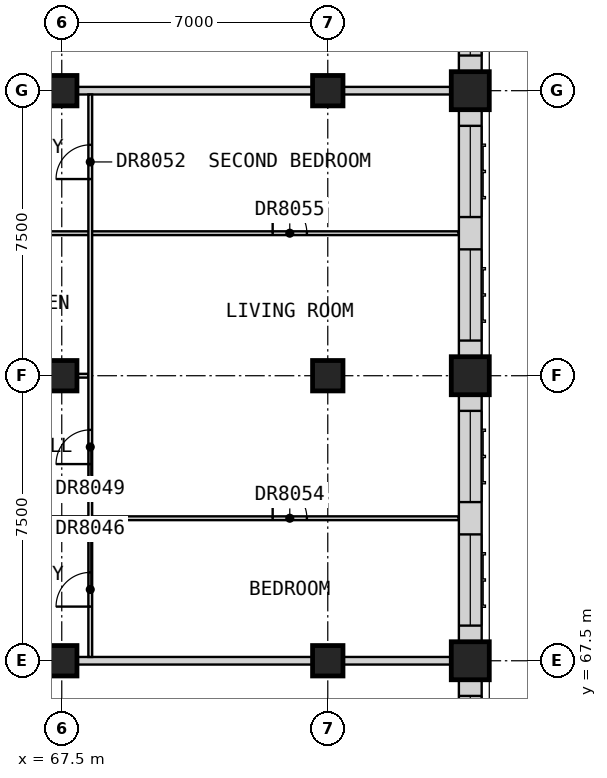
"""IFC4 building model, lengths in metres.
Left out: names, types, materials, properties, quantities, classifications, styles, units other than length and angle.
Written with IfcOpenShell. Run it as: python <this file> out.ifc"""

import sys

from ifc_helpers import new_model, si_unit, direction, frame, frame_2d, origin, origin_2d, place, context, subcontext, project, spatial, rectangle, extrude, element, fill, save


model = new_model("IFC4")
c1 = context("Model", 3, precision=1e-05, world=origin(), true_north=direction((0.0, 1.0)))
c2 = subcontext(c1, "Body", "Model", "MODEL_VIEW")
j1 = project(units=[si_unit("LENGTHUNIT", "METRE"), si_unit("PLANEANGLEUNIT", "RADIAN")], contexts=[c1])
p1 = place(None, origin())
s1 = spatial("IfcSite", under=j1, at=p1, CompositionType="ELEMENT")
p2 = place(p1, origin())
s2 = spatial("IfcBuilding", under=s1, at=p2, CompositionType="ELEMENT")
p3 = place(p2, frame((0.0, 0.0, 233.7)))
s3 = spatial("IfcBuildingStorey", under=s2, at=p3, CompositionType="ELEMENT", Elevation=233.7)
for number, where, z_axis, x_axis in (
    (1, (78.25, 67.5, 0.0), (0.0, 0.0, 1.0), (1.0, 0.0, 0.0)),
    (2, (78.25, 75.0, 0.0), (0.0, 0.0, 1.0), (1.0, 0.0, 0.0)),
    (3, (78.25, 82.5, 0.0), (0.0, 0.0, 1.0), (1.0, 0.0, 0.0)),
):
    element("IfcColumn", number, at=place(p3, frame(where, z_axis=z_axis, x_axis=x_axis)), inside=s3, PredefinedType="COLUMN", context=c2, shape_type="SweptSolid", body=[
        extrude(rectangle(XDim=1.0, YDim=1.0, at=origin_2d()), origin(), (0.0, 0.0, 1.0), 3.5),
    ])
for number, where, z_axis, x_axis in (
    (4, (67.5, 67.5, 0.0), (0.0, 0.0, 1.0), (1.0, 0.0, 0.0)),
    (5, (67.5, 75.0, 0.0), (0.0, 0.0, 1.0), (1.0, 0.0, 0.0)),
    (6, (67.5, 82.5, 0.0), (0.0, 0.0, 1.0), (1.0, 0.0, 0.0)),
    (7, (74.5, 67.5, 0.0), (0.0, 0.0, 1.0), (1.0, 0.0, 0.0)),
    (8, (74.5, 75.0, 0.0), (0.0, 0.0, 1.0), (1.0, 0.0, 0.0)),
    (9, (74.5, 82.5, 0.0), (0.0, 0.0, 1.0), (1.0, 0.0, 0.0)),
):
    element("IfcColumn", number, at=place(p3, frame(where, z_axis=z_axis, x_axis=x_axis)), inside=s3, PredefinedType="COLUMN", context=c2, shape_type="SweptSolid", body=[
        extrude(rectangle(XDim=0.8, YDim=0.8, at=origin_2d()), origin(), (0.0, 0.0, 1.0), 3.5),
    ])
p4 = place(p3, frame((78.25, 60.5, 0.0), z_axis=(0.0, 0.0, 1.0), x_axis=(0.0, 1.0, 0.0)))
e10 = element("IfcWall", 10, at=p4, inside=s3, PredefinedType="SOLIDWALL", context=c2, shape_type="SweptSolid", body=[
    extrude(rectangle(XDim=6.5, YDim=0.6, at=frame_2d((3.25, 0.0))), origin(), (0.0, 0.0, 1.0), 2.75),
])
p5 = place(p4, frame((0.425, 0.0, 0.8)))
e11 = element("IfcOpeningElement", 11, at=p5, cuts=e10, PredefinedType="OPENING", context=c2, shape_type="SweptSolid", body=[
    extrude(rectangle(XDim=2.4, YDim=1.8, at=frame_2d((1.2, 0.9))), frame((0.0, 0.31, 0.0), z_axis=(0.0, -1.0, 0.0), x_axis=(1.0, 0.0, 0.0)), (0.0, 0.0, 1.0), 0.62),
])
p6 = place(p4, frame((3.675, 0.0, 0.8)))
e12 = element("IfcOpeningElement", 12, at=p6, cuts=e10, PredefinedType="OPENING", context=c2, shape_type="SweptSolid", body=[
    extrude(rectangle(XDim=2.4, YDim=1.8, at=frame_2d((1.2, 0.9))), frame((0.0, 0.31, 0.0), z_axis=(0.0, -1.0, 0.0), x_axis=(1.0, 0.0, 0.0)), (0.0, 0.0, 1.0), 0.62),
])
p7 = place(p3, frame((78.25, 68.0, 0.0), z_axis=(0.0, 0.0, 1.0), x_axis=(0.0, 1.0, 0.0)))
e13 = element("IfcWall", 13, at=p7, inside=s3, PredefinedType="SOLIDWALL", context=c2, shape_type="SweptSolid", body=[
    extrude(rectangle(XDim=6.5, YDim=0.6, at=frame_2d((3.25, 0.0))), origin(), (0.0, 0.0, 1.0), 2.75),
])
p8 = place(p7, frame((0.425, 0.0, 0.8)))
e14 = element("IfcOpeningElement", 14, at=p8, cuts=e13, PredefinedType="OPENING", context=c2, shape_type="SweptSolid", body=[
    extrude(rectangle(XDim=2.4, YDim=1.8, at=frame_2d((1.2, 0.9))), frame((0.0, 0.31, 0.0), z_axis=(0.0, -1.0, 0.0), x_axis=(1.0, 0.0, 0.0)), (0.0, 0.0, 1.0), 0.62),
])
p9 = place(p7, frame((3.675, 0.0, 0.8)))
e15 = element("IfcOpeningElement", 15, at=p9, cuts=e13, PredefinedType="OPENING", context=c2, shape_type="SweptSolid", body=[
    extrude(rectangle(XDim=2.4, YDim=1.8, at=frame_2d((1.2, 0.9))), frame((0.0, 0.31, 0.0), z_axis=(0.0, -1.0, 0.0), x_axis=(1.0, 0.0, 0.0)), (0.0, 0.0, 1.0), 0.62),
])
p10 = place(p3, frame((78.25, 75.5, 0.0), z_axis=(0.0, 0.0, 1.0), x_axis=(0.0, 1.0, 0.0)))
e16 = element("IfcWall", 16, at=p10, inside=s3, PredefinedType="SOLIDWALL", context=c2, shape_type="SweptSolid", body=[
    extrude(rectangle(XDim=6.5, YDim=0.6, at=frame_2d((3.25, 0.0))), origin(), (0.0, 0.0, 1.0), 2.75),
])
p11 = place(p10, frame((0.425, 0.0, 0.8)))
e17 = element("IfcOpeningElement", 17, at=p11, cuts=e16, PredefinedType="OPENING", context=c2, shape_type="SweptSolid", body=[
    extrude(rectangle(XDim=2.4, YDim=1.8, at=frame_2d((1.2, 0.9))), frame((0.0, 0.31, 0.0), z_axis=(0.0, -1.0, 0.0), x_axis=(1.0, 0.0, 0.0)), (0.0, 0.0, 1.0), 0.62),
])
p12 = place(p10, frame((3.675, 0.0, 0.8)))
e18 = element("IfcOpeningElement", 18, at=p12, cuts=e16, PredefinedType="OPENING", context=c2, shape_type="SweptSolid", body=[
    extrude(rectangle(XDim=2.4, YDim=1.8, at=frame_2d((1.2, 0.9))), frame((0.0, 0.31, 0.0), z_axis=(0.0, -1.0, 0.0), x_axis=(1.0, 0.0, 0.0)), (0.0, 0.0, 1.0), 0.62),
])
p13 = place(p3, frame((78.25, 83.0, 0.0), z_axis=(0.0, 0.0, 1.0), x_axis=(0.0, 1.0, 0.0)))
e19 = element("IfcWall", 19, at=p13, inside=s3, PredefinedType="SOLIDWALL", context=c2, shape_type="SweptSolid", body=[
    extrude(rectangle(XDim=6.5, YDim=0.6, at=frame_2d((3.25, 0.0))), origin(), (0.0, 0.0, 1.0), 2.75),
])
p14 = place(p13, frame((0.425, 0.0, 0.8)))
e20 = element("IfcOpeningElement", 20, at=p14, cuts=e19, PredefinedType="OPENING", context=c2, shape_type="SweptSolid", body=[
    extrude(rectangle(XDim=2.4, YDim=1.8, at=frame_2d((1.2, 0.9))), frame((0.0, 0.31, 0.0), z_axis=(0.0, -1.0, 0.0), x_axis=(1.0, 0.0, 0.0)), (0.0, 0.0, 1.0), 0.62),
])
p15 = place(p13, frame((3.675, 0.0, 0.8)))
e21 = element("IfcOpeningElement", 21, at=p15, cuts=e19, PredefinedType="OPENING", context=c2, shape_type="SweptSolid", body=[
    extrude(rectangle(XDim=2.4, YDim=1.8, at=frame_2d((1.2, 0.9))), frame((0.0, 0.31, 0.0), z_axis=(0.0, -1.0, 0.0), x_axis=(1.0, 0.0, 0.0)), (0.0, 0.0, 1.0), 0.62),
])
for number, where, z_axis, x_axis in (
    (22, (61.875, 67.5, 0.0), (0.0, 0.0, 1.0), (1.0, 0.0, 0.0)),
    (23, (61.875, 82.5, 0.0), (0.0, 0.0, 1.0), (1.0, 0.0, 0.0)),
):
    element("IfcWall", number, at=place(p3, frame(where, z_axis=z_axis, x_axis=x_axis)), inside=s3, PredefinedType="PARTITIONING", context=c2, shape_type="SweptSolid", body=[
        extrude(rectangle(XDim=16.875, YDim=0.2, at=frame_2d((8.438, 0.0))), origin(), (0.0, 0.0, 1.0), 3.25),
    ])
p16 = place(p3, frame((65.087, 71.25, 0.0), z_axis=(0.0, 0.0, 1.0), x_axis=(1.0, 0.0, 0.0)))
e24 = element("IfcWall", 24, at=p16, inside=s3, PredefinedType="PARTITIONING", context=c2, shape_type="SweptSolid", body=[
    extrude(rectangle(XDim=12.853, YDim=0.1, at=frame_2d((6.426, 0.0))), origin(), (0.0, 0.0, 1.0), 3.25),
])
p17 = place(p16, frame((7.962, 0.0, 0.0)))
e25 = element("IfcOpeningElement", 25, at=p17, cuts=e24, PredefinedType="OPENING", context=c2, shape_type="SweptSolid", body=[
    extrude(rectangle(XDim=0.9, YDim=2.1, at=frame_2d((0.45, 1.05))), frame((0.0, 0.06, 0.0), z_axis=(0.0, -1.0, 0.0), x_axis=(1.0, 0.0, 0.0)), (0.0, 0.0, 1.0), 0.12),
])
p18 = place(p3, frame((65.087, 75.0, 0.0), z_axis=(0.0, 0.0, 1.0), x_axis=(1.0, 0.0, 0.0)))
e26 = element("IfcWall", 26, at=p18, inside=s3, PredefinedType="PARTITIONING", context=c2, shape_type="SweptSolid", body=[
    extrude(rectangle(XDim=3.113, YDim=0.1, at=frame_2d((1.556, 0.0))), origin(), (0.0, 0.0, 1.0), 3.25),
])
p19 = place(p18, frame((1.05, 0.0, 0.0)))
e27 = element("IfcOpeningElement", 27, at=p19, cuts=e26, PredefinedType="OPENING", context=c2, shape_type="SweptSolid", body=[
    extrude(rectangle(XDim=0.9, YDim=2.1, at=frame_2d((0.45, 1.05))), frame((0.0, 0.06, 0.0), z_axis=(0.0, -1.0, 0.0), x_axis=(1.0, 0.0, 0.0)), (0.0, 0.0, 1.0), 0.12),
])
p20 = place(p3, frame((65.087, 78.75, 0.0), z_axis=(0.0, 0.0, 1.0), x_axis=(1.0, 0.0, 0.0)))
e28 = element("IfcWall", 28, at=p20, inside=s3, PredefinedType="PARTITIONING", context=c2, shape_type="SweptSolid", body=[
    extrude(rectangle(XDim=12.853, YDim=0.1, at=frame_2d((6.426, 0.0))), origin(), (0.0, 0.0, 1.0), 3.25),
])
p21 = place(p20, frame((7.962, 0.0, 0.0)))
e29 = element("IfcOpeningElement", 29, at=p21, cuts=e28, PredefinedType="OPENING", context=c2, shape_type="SweptSolid", body=[
    extrude(rectangle(XDim=0.9, YDim=2.1, at=frame_2d((0.45, 1.05))), frame((0.0, 0.06, 0.0), z_axis=(0.0, -1.0, 0.0), x_axis=(1.0, 0.0, 0.0)), (0.0, 0.0, 1.0), 0.12),
])
p22 = place(p3, frame((68.25, 67.6, 0.0), z_axis=(0.0, 0.0, 1.0), x_axis=(0.0, 1.0, 0.0)))
e30 = element("IfcWall", 30, at=p22, inside=s3, PredefinedType="PARTITIONING", context=c2, shape_type="SweptSolid", body=[
    extrude(rectangle(XDim=14.8, YDim=0.1, at=frame_2d((7.4, 0.0))), origin(), (0.0, 0.0, 1.0), 3.25),
])
p23 = place(p22, frame((1.325, 0.0, 0.0)))
e31 = element("IfcOpeningElement", 31, at=p23, cuts=e30, PredefinedType="OPENING", context=c2, shape_type="SweptSolid", body=[
    extrude(rectangle(XDim=0.9, YDim=2.1, at=frame_2d((0.45, 1.05))), frame((0.0, 0.06, 0.0), z_axis=(0.0, -1.0, 0.0), x_axis=(1.0, 0.0, 0.0)), (0.0, 0.0, 1.0), 0.12),
])
p24 = place(p22, frame((5.075, 0.0, 0.0)))
e32 = element("IfcOpeningElement", 32, at=p24, cuts=e30, PredefinedType="OPENING", context=c2, shape_type="SweptSolid", body=[
    extrude(rectangle(XDim=0.9, YDim=2.1, at=frame_2d((0.45, 1.05))), frame((0.0, 0.06, 0.0), z_axis=(0.0, -1.0, 0.0), x_axis=(1.0, 0.0, 0.0)), (0.0, 0.0, 1.0), 0.12),
])
p25 = place(p22, frame((12.575, 0.0, 0.0)))
e33 = element("IfcOpeningElement", 33, at=p25, cuts=e30, PredefinedType="OPENING", context=c2, shape_type="SweptSolid", body=[
    extrude(rectangle(XDim=0.9, YDim=2.1, at=frame_2d((0.45, 1.05))), frame((0.0, 0.06, 0.0), z_axis=(0.0, -1.0, 0.0), x_axis=(1.0, 0.0, 0.0)), (0.0, 0.0, 1.0), 0.12),
])
p26 = place(p6, origin())
e34 = element("IfcWindow", 34, at=p26, inside=s3, PartitioningType="SINGLE_PANEL", PredefinedType="WINDOW", context=c2, shape_type="SweptSolid", body=[
    extrude(rectangle(XDim=2.4, YDim=1.8, at=frame_2d((1.2, 0.9))), frame((0.0, -0.07, 0.0), z_axis=(0.0, -1.0, 0.0), x_axis=(1.0, 0.0, 0.0)), (0.0, 0.0, 1.0), 0.06),
])
fill(e12, e34)
p27 = place(p8, origin())
e35 = element("IfcWindow", 35, at=p27, inside=s3, PartitioningType="SINGLE_PANEL", PredefinedType="WINDOW", context=c2, shape_type="SweptSolid", body=[
    extrude(rectangle(XDim=2.4, YDim=1.8, at=frame_2d((1.2, 0.9))), frame((0.0, -0.07, 0.0), z_axis=(0.0, -1.0, 0.0), x_axis=(1.0, 0.0, 0.0)), (0.0, 0.0, 1.0), 0.06),
])
fill(e14, e35)
p28 = place(p9, origin())
e36 = element("IfcWindow", 36, at=p28, inside=s3, PartitioningType="SINGLE_PANEL", PredefinedType="WINDOW", context=c2, shape_type="SweptSolid", body=[
    extrude(rectangle(XDim=2.4, YDim=1.8, at=frame_2d((1.2, 0.9))), frame((0.0, -0.07, 0.0), z_axis=(0.0, -1.0, 0.0), x_axis=(1.0, 0.0, 0.0)), (0.0, 0.0, 1.0), 0.06),
])
fill(e15, e36)
p29 = place(p11, origin())
e37 = element("IfcWindow", 37, at=p29, inside=s3, PartitioningType="SINGLE_PANEL", PredefinedType="WINDOW", context=c2, shape_type="SweptSolid", body=[
    extrude(rectangle(XDim=2.4, YDim=1.8, at=frame_2d((1.2, 0.9))), frame((0.0, -0.07, 0.0), z_axis=(0.0, -1.0, 0.0), x_axis=(1.0, 0.0, 0.0)), (0.0, 0.0, 1.0), 0.06),
])
fill(e17, e37)
p30 = place(p12, origin())
e38 = element("IfcWindow", 38, at=p30, inside=s3, PartitioningType="SINGLE_PANEL", PredefinedType="WINDOW", context=c2, shape_type="SweptSolid", body=[
    extrude(rectangle(XDim=2.4, YDim=1.8, at=frame_2d((1.2, 0.9))), frame((0.0, -0.07, 0.0), z_axis=(0.0, -1.0, 0.0), x_axis=(1.0, 0.0, 0.0)), (0.0, 0.0, 1.0), 0.06),
])
fill(e18, e38)
p31 = place(p14, origin())
e39 = element("IfcWindow", 39, at=p31, inside=s3, PartitioningType="SINGLE_PANEL", PredefinedType="WINDOW", context=c2, shape_type="SweptSolid", body=[
    extrude(rectangle(XDim=2.4, YDim=1.8, at=frame_2d((1.2, 0.9))), frame((0.0, -0.07, 0.0), z_axis=(0.0, -1.0, 0.0), x_axis=(1.0, 0.0, 0.0)), (0.0, 0.0, 1.0), 0.06),
])
fill(e20, e39)
p32 = place(p23, origin())
e40 = element("IfcDoor", 40, at=p32, inside=s3, OperationType="SINGLE_SWING_LEFT", PredefinedType="DOOR", context=c2, shape_type="SweptSolid", body=[
    extrude(rectangle(XDim=0.9, YDim=2.1, at=frame_2d((0.45, 1.05))), frame((0.0, 0.025, 0.0), z_axis=(0.0, -1.0, 0.0), x_axis=(1.0, 0.0, 0.0)), (0.0, 0.0, 1.0), 0.05),
])
fill(e31, e40)
p33 = place(p24, origin())
e41 = element("IfcDoor", 41, at=p33, inside=s3, OperationType="SINGLE_SWING_LEFT", PredefinedType="DOOR", context=c2, shape_type="SweptSolid", body=[
    extrude(rectangle(XDim=0.9, YDim=2.1, at=frame_2d((0.45, 1.05))), frame((0.0, 0.025, 0.0), z_axis=(0.0, -1.0, 0.0), x_axis=(1.0, 0.0, 0.0)), (0.0, 0.0, 1.0), 0.05),
])
fill(e32, e41)
p34 = place(p25, origin())
e42 = element("IfcDoor", 42, at=p34, inside=s3, OperationType="SINGLE_SWING_LEFT", PredefinedType="DOOR", context=c2, shape_type="SweptSolid", body=[
    extrude(rectangle(XDim=0.9, YDim=2.1, at=frame_2d((0.45, 1.05))), frame((0.0, 0.025, 0.0), z_axis=(0.0, -1.0, 0.0), x_axis=(1.0, 0.0, 0.0)), (0.0, 0.0, 1.0), 0.05),
])
fill(e33, e42)
p35 = place(p17, origin())
e43 = element("IfcDoor", 43, at=p35, inside=s3, OperationType="SINGLE_SWING_RIGHT", PredefinedType="DOOR", context=c2, shape_type="SweptSolid", body=[
    extrude(rectangle(XDim=0.9, YDim=2.1, at=frame_2d((0.45, 1.05))), frame((0.0, 0.025, 0.0), z_axis=(0.0, -1.0, 0.0), x_axis=(1.0, 0.0, 0.0)), (0.0, 0.0, 1.0), 0.05),
])
fill(e25, e43)
p36 = place(p21, origin())
e44 = element("IfcDoor", 44, at=p36, inside=s3, OperationType="SINGLE_SWING_RIGHT", PredefinedType="DOOR", context=c2, shape_type="SweptSolid", body=[
    extrude(rectangle(XDim=0.9, YDim=2.1, at=frame_2d((0.45, 1.05))), frame((0.0, 0.025, 0.0), z_axis=(0.0, -1.0, 0.0), x_axis=(1.0, 0.0, 0.0)), (0.0, 0.0, 1.0), 0.05),
])
fill(e29, e44)
save(model, sys.argv[1])
